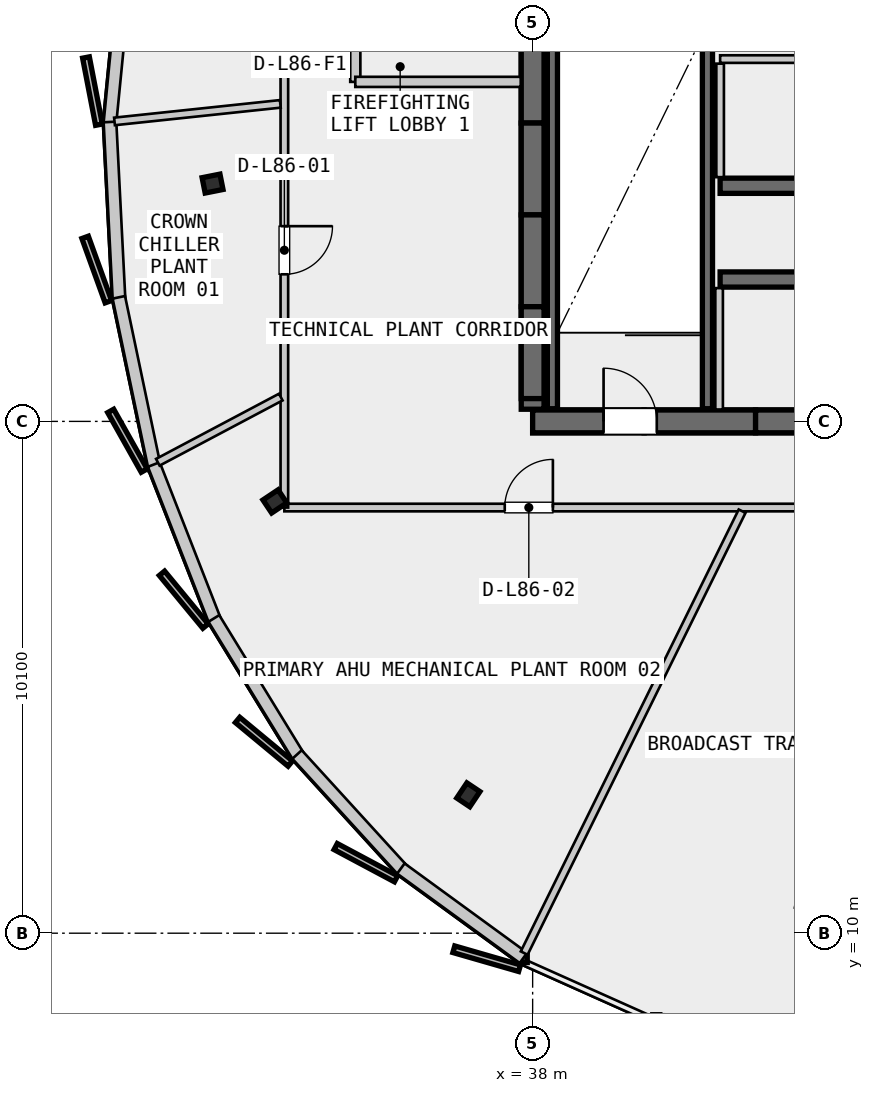
"""IFC4 building model, lengths in metres.
Left out: names, types, materials, properties, quantities, classifications, styles, units other than length and angle.
Written with IfcOpenShell. Run it as: python <this file> out.ifc"""

import sys

from ifc_helpers import new_model, si_unit, direction, frame, frame_2d, origin, origin_2d, place, context, subcontext, project, spatial, rectangle, i_section, extrude, source, transform, mapped, element, fill, save


model = new_model("IFC4")
c1 = context("Model", 3, precision=1e-05, world=origin(), true_north=direction((0.0, 1.0)))
c2 = subcontext(c1, "Body", "Model", "MODEL_VIEW")
j1 = project(units=[si_unit("LENGTHUNIT", "METRE"), si_unit("PLANEANGLEUNIT", "RADIAN")], contexts=[c1])
p1 = place(None, origin())
s1 = spatial("IfcSite", under=j1, at=p1, CompositionType="ELEMENT")
p2 = place(p1, origin())
s2 = spatial("IfcBuilding", under=s1, at=p2, CompositionType="ELEMENT")
p3 = place(p2, frame((0.0, 0.0, 324.3)))
s3 = spatial("IfcBuildingStorey", under=s2, at=p3, CompositionType="ELEMENT", Elevation=324.3)
p4 = place(p3, frame((38.0, 20.1, 0.0), z_axis=(0.0, 0.0, 1.0), x_axis=(1.0, 0.0, 0.0)))
e1 = element("IfcWall", 1, at=p4, inside=s3, PredefinedType="SHEAR", context=c2, shape_type="SweptSolid", body=[
    extrude(rectangle(XDim=17.6, YDim=0.45, at=frame_2d((8.8, 0.0))), origin(), (0.0, 0.0, 1.0), 4.2),
])
p5 = place(p4, frame((1.4, 0.0, 0.0)))
e2 = element("IfcOpeningElement", 2, at=p5, cuts=e1, PredefinedType="OPENING", context=c2, shape_type="SweptSolid", body=[
    extrude(rectangle(XDim=1.05, YDim=2.15, at=frame_2d((0.525, 1.075))), frame((0.0, 0.235, 0.0), z_axis=(0.0, -1.0, 0.0), x_axis=(1.0, 0.0, 0.0)), (0.0, 0.0, 1.0), 0.47),
])
p6 = place(p4, frame((15.15, 0.0, 0.0)))
e3 = element("IfcOpeningElement", 3, at=p6, cuts=e1, PredefinedType="OPENING", context=c2, shape_type="SweptSolid", body=[
    extrude(rectangle(XDim=1.05, YDim=2.15, at=frame_2d((0.525, 1.075))), frame((0.0, 0.235, 0.0), z_axis=(0.0, -1.0, 0.0), x_axis=(1.0, 0.0, 0.0)), (0.0, 0.0, 1.0), 0.47),
])
p7 = place(p4, frame((5.25, 0.0, 0.0)))
e4 = element("IfcOpeningElement", 4, at=p7, cuts=e1, PredefinedType="OPENING", context=c2, shape_type="SweptSolid", body=[
    extrude(rectangle(XDim=0.9, YDim=2.15, at=frame_2d((0.45, 1.075))), frame((0.0, 0.235, 0.0), z_axis=(0.0, -1.0, 0.0), x_axis=(1.0, 0.0, 0.0)), (0.0, 0.0, 1.0), 0.47),
])
p8 = place(p4, frame((11.4, 0.0, 0.0)))
e5 = element("IfcOpeningElement", 5, at=p8, cuts=e1, PredefinedType="OPENING", context=c2, shape_type="SweptSolid", body=[
    extrude(rectangle(XDim=0.95, YDim=2.15, at=frame_2d((0.475, 1.075))), frame((0.0, 0.235, 0.0), z_axis=(0.0, -1.0, 0.0), x_axis=(1.0, 0.0, 0.0)), (0.0, 0.0, 1.0), 0.47),
])
p9 = place(p3, frame((38.0, 35.26, 0.0), z_axis=(0.0, 0.0, 1.0), x_axis=(0.0, -1.0, 0.0)))
e6 = element("IfcWall", 6, at=p9, inside=s3, PredefinedType="SHEAR", context=c2, shape_type="SweptSolid", body=[
    extrude(rectangle(XDim=14.92, YDim=0.45, at=frame_2d((7.46, 0.0))), origin(), (0.0, 0.0, 1.0), 4.2),
])
p10 = place(p9, frame((5.21, 0.0, 0.0)))
e7 = element("IfcOpeningElement", 7, at=p10, cuts=e6, PredefinedType="OPENING", context=c2, shape_type="SweptSolid", body=[
    extrude(rectangle(XDim=1.1, YDim=2.2, at=frame_2d((0.55, 1.1))), frame((0.0, 0.235, 0.0), z_axis=(0.0, -1.0, 0.0), x_axis=(1.0, 0.0, 0.0)), (0.0, 0.0, 1.0), 0.47),
])
p11 = place(p3, frame((41.7, 22.9, 0.0), z_axis=(0.0, 0.0, 1.0), x_axis=(1.0, 0.0, 0.0)))
e8 = element("IfcWall", 8, at=p11, inside=s3, PredefinedType="SHEAR", context=c2, shape_type="SweptSolid", body=[
    extrude(rectangle(XDim=4.25, YDim=0.3, at=frame_2d((2.125, 0.0))), origin(), (0.0, 0.0, 1.0), 4.2),
])
p12 = place(p3, frame((41.7, 24.75, 0.0), z_axis=(0.0, 0.0, 1.0), x_axis=(1.0, 0.0, 0.0)))
e9 = element("IfcWall", 9, at=p12, inside=s3, PredefinedType="SHEAR", context=c2, shape_type="SweptSolid", body=[
    extrude(rectangle(XDim=4.25, YDim=0.3, at=frame_2d((2.125, 0.0))), origin(), (0.0, 0.0, 1.0), 4.2),
])
p13 = place(p12, frame((1.55, 0.0, 0.0)))
e10 = element("IfcOpeningElement", 10, at=p13, cuts=e9, PredefinedType="OPENING", context=c2, shape_type="SweptSolid", body=[
    extrude(rectangle(XDim=0.95, YDim=2.15, at=frame_2d((0.475, 1.075))), frame((0.0, 0.16, 0.0), z_axis=(0.0, -1.0, 0.0), x_axis=(1.0, 0.0, 0.0)), (0.0, 0.0, 1.0), 0.32),
])
m1 = source(origin(), c2, "Body", "SweptSolid", [
    extrude(i_section(OverallWidth=0.309, OverallDepth=0.359, WebThickness=0.016, FlangeThickness=0.026, FilletRadius=0.027, at=origin_2d()), origin(), (0.0, 0.0, 1.0), 6.407),
])
p14 = place(p3, frame((31.683, 24.793, 0.0), z_axis=(0.0, 0.0, 1.0), x_axis=(-0.980785280403, -0.195090322016, 0.0)))
e11 = element("IfcColumn", 11, at=p14, inside=s3, PredefinedType="COLUMN", context=c2, shape_type="MappedRepresentation", body=[
    mapped(m1, transform((0.0, 0.0, 0.0), scale=1.0)),
])
m2 = source(origin(), c2, "Body", "SweptSolid", [
    extrude(i_section(OverallWidth=0.309, OverallDepth=0.359, WebThickness=0.016, FlangeThickness=0.026, FilletRadius=0.027, at=origin_2d()), origin(), (0.0, 0.0, 1.0), 5.374),
])
p15 = place(p3, frame((32.913, 18.521, 0.0), z_axis=(0.0, 0.0, 1.0), x_axis=(-0.831469612303, -0.55557023302, 0.0)))
e12 = element("IfcColumn", 12, at=p15, inside=s3, PredefinedType="COLUMN", context=c2, shape_type="MappedRepresentation", body=[
    mapped(m2, transform((0.0, 0.0, 0.0), scale=1.0)),
])
m3 = source(origin(), c2, "Body", "SweptSolid", [
    extrude(i_section(OverallWidth=0.309, OverallDepth=0.359, WebThickness=0.016, FlangeThickness=0.026, FilletRadius=0.027, at=origin_2d()), origin(), (0.0, 0.0, 1.0), 4.573),
])
p16 = place(p3, frame((36.731, 12.731, 0.0), z_axis=(0.0, 0.0, 1.0), x_axis=(-0.55557023302, -0.831469612303, 0.0)))
e13 = element("IfcColumn", 13, at=p16, inside=s3, PredefinedType="COLUMN", context=c2, shape_type="MappedRepresentation", body=[
    mapped(m3, transform((0.0, 0.0, 0.0), scale=1.0)),
])
p17 = place(p3, frame((38.0, 20.1, 4.2), z_axis=(0.0, 0.0, 1.0), x_axis=(1.0, 0.0, 0.0)))
e14 = element("IfcWall", 14, at=p17, inside=s3, PredefinedType="SHEAR", context=c2, shape_type="SweptSolid", body=[
    extrude(rectangle(XDim=2.2, YDim=0.45, at=frame_2d((1.1, 0.0))), origin(), (0.0, 0.0, 1.0), 1.752),
])
p18 = place(p3, frame((40.2, 20.1, 4.2), z_axis=(0.0, 0.0, 1.0), x_axis=(1.0, 0.0, 0.0)))
e15 = element("IfcWall", 15, at=p18, inside=s3, PredefinedType="SHEAR", context=c2, shape_type="SweptSolid", body=[
    extrude(rectangle(XDim=2.2, YDim=0.45, at=frame_2d((1.1, 0.0))), origin(), (0.0, 0.0, 1.0), 1.878),
])
p19 = place(p3, frame((42.4, 20.1, 4.2), z_axis=(0.0, 0.0, 1.0), x_axis=(1.0, 0.0, 0.0)))
e16 = element("IfcWall", 16, at=p19, inside=s3, PredefinedType="SHEAR", context=c2, shape_type="SweptSolid", body=[
    extrude(rectangle(XDim=2.2, YDim=0.45, at=frame_2d((1.1, 0.0))), origin(), (0.0, 0.0, 1.0), 2.004),
])
p20 = place(p3, frame((38.0, 27.8, 4.2), z_axis=(0.0, 0.0, 1.0), x_axis=(0.0, -1.0, 0.0)))
e17 = element("IfcWall", 17, at=p20, inside=s3, PredefinedType="SHEAR", context=c2, shape_type="SweptSolid", body=[
    extrude(rectangle(XDim=1.812, YDim=0.45, at=frame_2d((0.906, 0.0))), origin(), (0.0, 0.0, 1.0), 2.788),
])
p21 = place(p3, frame((38.0, 25.988, 4.2), z_axis=(0.0, 0.0, 1.0), x_axis=(0.0, -1.0, 0.0)))
e18 = element("IfcWall", 18, at=p21, inside=s3, PredefinedType="SHEAR", context=c2, shape_type="SweptSolid", body=[
    extrude(rectangle(XDim=1.812, YDim=0.45, at=frame_2d((0.906, 0.0))), origin(), (0.0, 0.0, 1.0), 2.469),
])
p22 = place(p3, frame((38.0, 24.175, 4.2), z_axis=(0.0, 0.0, 1.0), x_axis=(0.0, -1.0, 0.0)))
e19 = element("IfcWall", 19, at=p22, inside=s3, PredefinedType="SHEAR", context=c2, shape_type="SweptSolid", body=[
    extrude(rectangle(XDim=1.812, YDim=0.45, at=frame_2d((0.906, 0.0))), origin(), (0.0, 0.0, 1.0), 2.15),
])
p23 = place(p3, frame((38.0, 22.363, 4.2), z_axis=(0.0, 0.0, 1.0), x_axis=(0.0, -1.0, 0.0)))
e20 = element("IfcWall", 20, at=p23, inside=s3, PredefinedType="SHEAR", context=c2, shape_type="SweptSolid", body=[
    extrude(rectangle(XDim=1.812, YDim=0.45, at=frame_2d((0.906, 0.0))), origin(), (0.0, 0.0, 1.0), 1.831),
])
p24 = place(p3, frame((30.005, 29.525, 6.506), z_axis=(0.0, 0.0, 1.0), x_axis=(-0.097762221924, -0.995209800979, 0.0)))
e21 = element("IfcWall", 21, at=p24, inside=s3, PredefinedType="PARAPET", context=c2, shape_type="SweptSolid", body=[
    extrude(rectangle(XDim=3.554, YDim=0.25, at=frame_2d((1.777, 0.0))), origin(), (0.0, 0.0, 1.0), 0.341),
])
p25 = place(p3, frame((29.658, 26.009, 5.903), z_axis=(0.0, 0.0, 1.0), x_axis=(0.050978363746, -0.9986997579, 0.0)))
e22 = element("IfcWall", 22, at=p25, inside=s3, PredefinedType="PARAPET", context=c2, shape_type="SweptSolid", body=[
    extrude(rectangle(XDim=3.487, YDim=0.25, at=frame_2d((1.743, 0.0))), origin(), (0.0, 0.0, 1.0), 0.321),
])
p26 = place(p3, frame((29.833, 22.549, 5.359), z_axis=(0.0, 0.0, 1.0), x_axis=(0.205444892751, -0.978668685533, 0.0)))
e23 = element("IfcWall", 23, at=p26, inside=s3, PredefinedType="PARAPET", context=c2, shape_type="SweptSolid", body=[
    extrude(rectangle(XDim=3.394, YDim=0.25, at=frame_2d((1.697, 0.0))), origin(), (0.0, 0.0, 1.0), 0.292),
])
p27 = place(p3, frame((30.524, 19.249, 4.889), z_axis=(0.0, 0.0, 1.0), x_axis=(0.363973425336, -0.931409333027, 0.0)))
e24 = element("IfcWall", 24, at=p27, inside=s3, PredefinedType="PARAPET", context=c2, shape_type="SweptSolid", body=[
    extrude(rectangle(XDim=3.285, YDim=0.25, at=frame_2d((1.643, 0.0))), origin(), (0.0, 0.0, 1.0), 0.255),
])
p28 = place(p3, frame((31.709, 16.211, 4.507), z_axis=(0.0, 0.0, 1.0), x_axis=(0.522495301816, -0.852642163853, 0.0)))
e25 = element("IfcWall", 25, at=p28, inside=s3, PredefinedType="PARAPET", context=c2, shape_type="SweptSolid", body=[
    extrude(rectangle(XDim=3.173, YDim=0.25, at=frame_2d((1.586, 0.0))), origin(), (0.0, 0.0, 1.0), 0.21),
])
p29 = place(p3, frame((33.351, 13.527, 4.226), z_axis=(0.0, 0.0, 1.0), x_axis=(0.673890442093, -0.738831287951, 0.0)))
e26 = element("IfcWall", 26, at=p29, inside=s3, PredefinedType="PARAPET", context=c2, shape_type="SweptSolid", body=[
    extrude(rectangle(XDim=3.072, YDim=0.25, at=frame_2d((1.536, 0.0))), origin(), (0.0, 0.0, 1.0), 0.16),
])
p30 = place(p3, frame((35.4, 11.276, 4.054), z_axis=(0.0, 0.0, 1.0), x_axis=(0.808001867987, -0.589179922715, 0.0)))
e27 = element("IfcWall", 27, at=p30, inside=s3, PredefinedType="PARAPET", context=c2, shape_type="SweptSolid", body=[
    extrude(rectangle(XDim=2.993, YDim=0.25, at=frame_2d((1.497, 0.0))), origin(), (0.0, 0.0, 1.0), 0.106),
])
for number, where, z_axis, x_axis in (
    (28, (41.45, 27.7, 0.0), (0.0, 0.0, 1.0), (0.0, -1.0, 0.0)),
    (29, (38.39, 20.35, 0.0), (0.0, 0.0, 1.0), (0.0, 1.0, 0.0)),
):
    element("IfcWall", number, at=place(p3, frame(where, z_axis=z_axis, x_axis=x_axis)), inside=s3, PredefinedType="SHEAR", context=c2, shape_type="SweptSolid", body=[
        extrude(rectangle(XDim=7.35, YDim=0.2, at=frame_2d((3.675, 0.0))), origin(), (0.0, 0.0, 1.0), 4.2),
    ])
p31 = place(p3, frame((34.5, 31.2, 0.0), z_axis=(0.0, 0.0, 1.0), x_axis=(0.0, -1.0, 0.0)))
e30 = element("IfcWall", 30, at=p31, inside=s3, PredefinedType="PARTITIONING", context=c2, shape_type="SweptSolid", body=[
    extrude(rectangle(XDim=4.4, YDim=0.2, at=frame_2d((2.2, 0.0))), origin(), (0.0, 0.0, 1.0), 3.49),
])
p32 = place(p31, frame((1.65, 0.0, 0.0)))
e31 = element("IfcOpeningElement", 31, at=p32, cuts=e30, PredefinedType="OPENING", context=c2, shape_type="SweptSolid", body=[
    extrude(rectangle(XDim=1.05, YDim=2.15, at=frame_2d((0.525, 1.075))), frame((0.0, 0.11, 0.0), z_axis=(0.0, -1.0, 0.0), x_axis=(1.0, 0.0, 0.0)), (0.0, 0.0, 1.0), 0.22),
])
p33 = place(p3, frame((34.5, 26.8, 0.0), z_axis=(0.0, 0.0, 1.0), x_axis=(1.0, 0.0, 0.0)))
e32 = element("IfcWall", 32, at=p33, inside=s3, PredefinedType="PARTITIONING", context=c2, shape_type="SweptSolid", body=[
    extrude(rectangle(XDim=3.265, YDim=0.2, at=frame_2d((1.632, 0.0))), origin(), (0.0, 0.0, 1.0), 3.49),
])
p34 = place(p3, frame((41.68, 20.335, 0.0), z_axis=(0.0, 0.0, 1.0), x_axis=(0.0, 1.0, 0.0)))
e33 = element("IfcWall", 33, at=p34, inside=s3, PredefinedType="PARTITIONING", context=c2, shape_type="SweptSolid", body=[
    extrude(rectangle(XDim=2.395, YDim=0.15, at=frame_2d((1.198, 0.0))), origin(), (0.0, 0.0, 1.0), 3.49),
])
p35 = place(p3, frame((41.7, 27.25, 0.0), z_axis=(0.0, 0.0, 1.0), x_axis=(1.0, 0.0, 0.0)))
e34 = element("IfcWall", 34, at=p35, inside=s3, PredefinedType="PARTITIONING", context=c2, shape_type="SweptSolid", body=[
    extrude(rectangle(XDim=4.25, YDim=0.15, at=frame_2d((2.125, 0.0))), origin(), (0.0, 0.0, 1.0), 2.76),
])
p36 = place(p3, frame((41.7, 24.92, 0.0), z_axis=(0.0, 0.0, 1.0), x_axis=(0.0, 1.0, 0.0)))
e35 = element("IfcWall", 35, at=p36, inside=s3, PredefinedType="PARTITIONING", context=c2, shape_type="SweptSolid", body=[
    extrude(rectangle(XDim=2.24, YDim=0.15, at=frame_2d((1.12, 0.0))), origin(), (0.0, 0.0, 1.0), 2.76),
])
p37 = place(p3, frame((33.1, 18.4, 0.0), z_axis=(0.0, 0.0, 1.0), x_axis=(1.0, 0.0, 0.0)))
e36 = element("IfcWall", 36, at=p37, inside=s3, PredefinedType="PARTITIONING", context=c2, shape_type="SweptSolid", body=[
    extrude(rectangle(XDim=27.4, YDim=0.15, at=frame_2d((13.7, 0.0))), origin(), (0.0, 0.0, 1.0), 3.49),
])
p38 = place(p37, frame((4.35, 0.0, 0.0)))
e37 = element("IfcOpeningElement", 37, at=p38, cuts=e36, PredefinedType="OPENING", context=c2, shape_type="SweptSolid", body=[
    extrude(rectangle(XDim=0.95, YDim=2.15, at=frame_2d((0.475, 1.075))), frame((0.0, 0.085, 0.0), z_axis=(0.0, -1.0, 0.0), x_axis=(1.0, 0.0, 0.0)), (0.0, 0.0, 1.0), 0.17),
])
p39 = place(p37, frame((11.499, 0.0, 0.0)))
e38 = element("IfcOpeningElement", 38, at=p39, cuts=e36, PredefinedType="OPENING", context=c2, shape_type="SweptSolid", body=[
    extrude(rectangle(XDim=0.95, YDim=2.15, at=frame_2d((0.475, 1.075))), frame((0.0, 0.085, 0.0), z_axis=(0.0, -1.0, 0.0), x_axis=(1.0, 0.0, 0.0)), (0.0, 0.0, 1.0), 0.17),
])
p40 = place(p37, frame((19.13, 0.0, 0.0)))
e39 = element("IfcOpeningElement", 39, at=p40, cuts=e36, PredefinedType="OPENING", context=c2, shape_type="SweptSolid", body=[
    extrude(rectangle(XDim=0.95, YDim=2.15, at=frame_2d((0.475, 1.075))), frame((0.0, 0.085, 0.0), z_axis=(0.0, -1.0, 0.0), x_axis=(1.0, 0.0, 0.0)), (0.0, 0.0, 1.0), 0.17),
])
p41 = place(p3, frame((33.1, 37.2, 0.0), z_axis=(0.0, 0.0, 1.0), x_axis=(0.0, -1.0, 0.0)))
e40 = element("IfcWall", 40, at=p41, inside=s3, PredefinedType="PARTITIONING", context=c2, shape_type="SweptSolid", body=[
    extrude(rectangle(XDim=18.8, YDim=0.15, at=frame_2d((9.4, 0.0))), origin(), (0.0, 0.0, 1.0), 3.49),
])
p42 = place(p41, frame((13.247, 0.0, 0.0)))
e41 = element("IfcOpeningElement", 41, at=p42, cuts=e40, PredefinedType="OPENING", context=c2, shape_type="SweptSolid", body=[
    extrude(rectangle(XDim=0.95, YDim=2.15, at=frame_2d((0.475, 1.075))), frame((0.0, 0.085, 0.0), z_axis=(0.0, -1.0, 0.0), x_axis=(1.0, 0.0, 0.0)), (0.0, 0.0, 1.0), 0.17),
])
p43 = place(p41, frame((4.428, 0.0, 0.0)))
e42 = element("IfcOpeningElement", 42, at=p43, cuts=e40, PredefinedType="OPENING", context=c2, shape_type="SweptSolid", body=[
    extrude(rectangle(XDim=0.95, YDim=2.15, at=frame_2d((0.475, 1.075))), frame((0.0, 0.085, 0.0), z_axis=(0.0, -1.0, 0.0), x_axis=(1.0, 0.0, 0.0)), (0.0, 0.0, 1.0), 0.17),
])
p44 = place(p3, frame((33.021, 26.366, 0.0), z_axis=(0.0, 0.0, 1.0), x_axis=(-0.994443901879, -0.105267877416, 0.0)))
e43 = element("IfcWall", 43, at=p44, inside=s3, PredefinedType="PARTITIONING", context=c2, shape_type="SweptSolid", body=[
    extrude(rectangle(XDim=3.291, YDim=0.15, at=frame_2d((1.646, 0.0))), origin(), (0.0, 0.0, 1.0), 3.49),
])
p45 = place(p3, frame((33.029, 20.58, 0.0), z_axis=(0.0, 0.0, 1.0), x_axis=(-0.883543474872, -0.468349151821, 0.0)))
e44 = element("IfcWall", 44, at=p45, inside=s3, PredefinedType="PARTITIONING", context=c2, shape_type="SweptSolid", body=[
    extrude(rectangle(XDim=2.747, YDim=0.15, at=frame_2d((1.373, 0.0))), origin(), (0.0, 0.0, 1.0), 3.49),
])
p46 = place(p3, frame((42.134, 18.328, 0.0), z_axis=(0.0, 0.0, 1.0), x_axis=(-0.442285567436, -0.896874281512, 0.0)))
e45 = element("IfcWall", 45, at=p46, inside=s3, PredefinedType="PARTITIONING", context=c2, shape_type="SweptSolid", body=[
    extrude(rectangle(XDim=9.723, YDim=0.15, at=frame_2d((4.862, 0.0))), origin(), (0.0, 0.0, 1.0), 3.49),
])
m4 = source(origin(), c2, "Body", "SweptSolid", [
    extrude(rectangle(XDim=1.05, YDim=2.15, at=frame_2d((0.525, 1.075))), frame((0.0, 0.025, 0.0), z_axis=(0.0, -1.0, 0.0), x_axis=(1.0, 0.0, 0.0)), (0.0, 0.0, 1.0), 0.05),
])
p47 = place(p5, origin())
e46 = element("IfcDoor", 46, at=p47, inside=s3, OperationType="SINGLE_SWING_LEFT", PredefinedType="DOOR", context=c2, shape_type="MappedRepresentation", body=[
    mapped(m4, transform((0.0, 0.0, 0.0), scale=1.0)),
])
fill(e2, e46)
m5 = source(origin(), c2, "Body", "SweptSolid", [
    extrude(rectangle(XDim=0.95, YDim=2.15, at=frame_2d((0.475, 1.075))), frame((0.0, 0.025, 0.0), z_axis=(0.0, -1.0, 0.0), x_axis=(1.0, 0.0, 0.0)), (0.0, 0.0, 1.0), 0.05),
])
p48 = place(p38, origin())
e47 = element("IfcDoor", 47, at=p48, inside=s3, OperationType="SINGLE_SWING_RIGHT", PredefinedType="DOOR", context=c2, shape_type="MappedRepresentation", body=[
    mapped(m5, transform((0.0, 0.0, 0.0), scale=1.0)),
])
fill(e37, e47)
p49 = place(p42, origin())
e48 = element("IfcDoor", 48, at=p49, inside=s3, OperationType="SINGLE_SWING_LEFT", PredefinedType="DOOR", context=c2, shape_type="MappedRepresentation", body=[
    mapped(m5, transform((0.0, 0.0, 0.0), scale=1.0)),
])
fill(e41, e48)
save(model, sys.argv[1])
